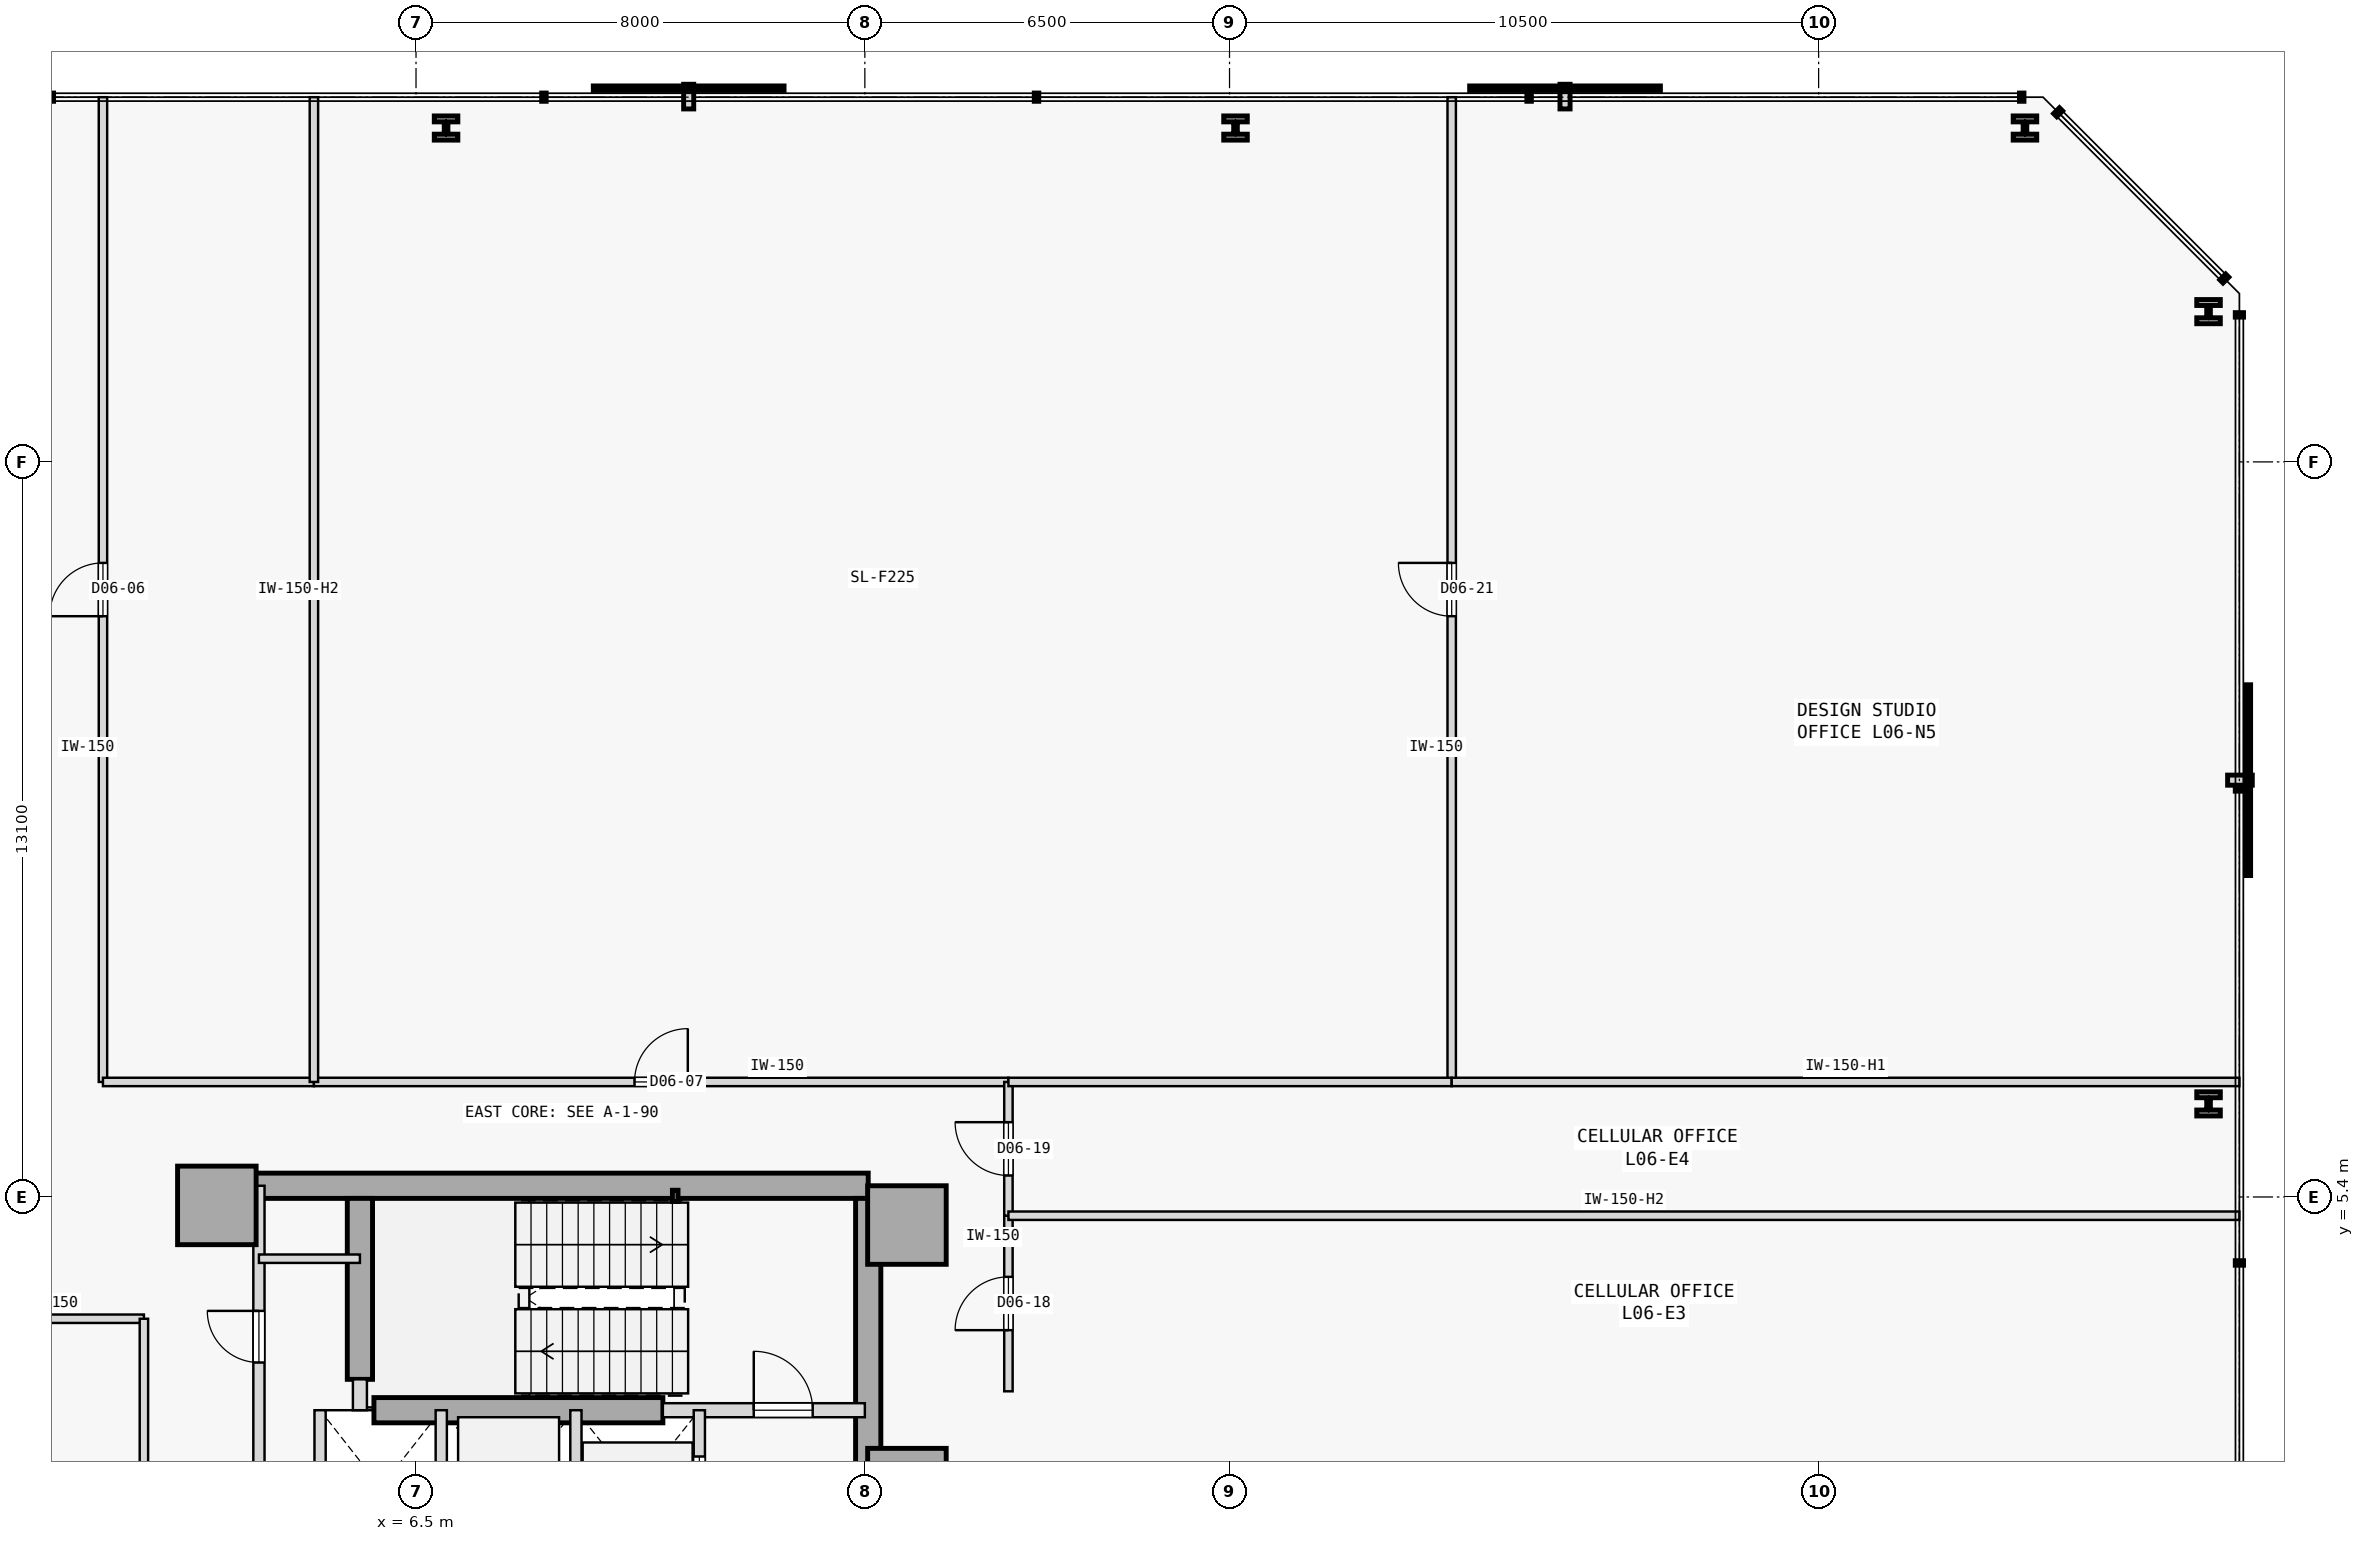
"""IFC4 building model, lengths in metres.
Left out: names, types, materials, properties, quantities, classifications, styles, units other than length and angle.
Written with IfcOpenShell. Run it as: python <this file> out.ifc"""

import sys

from ifc_helpers import new_model, si_unit, direction, frame, frame_2d, origin, origin_2d, place, context, subcontext, project, spatial, rectangle, hollow_rectangle, i_section, extrude, element, fill, save


model = new_model("IFC4")
c1 = context("Model", 3, precision=1e-05, world=origin(), true_north=direction((0.0, 1.0)))
c2 = subcontext(c1, "Body", "Model", "MODEL_VIEW")
j1 = project(units=[si_unit("LENGTHUNIT", "METRE"), si_unit("PLANEANGLEUNIT", "RADIAN")], contexts=[c1])
p1 = place(None, origin())
s1 = spatial("IfcSite", under=j1, at=p1, CompositionType="ELEMENT")
p2 = place(p1, origin())
s2 = spatial("IfcBuilding", under=s1, at=p2, CompositionType="ELEMENT")
p3 = place(p2, frame((0.0, 0.0, 29.4)))
s3 = spatial("IfcBuildingStorey", under=s2, at=p3, CompositionType="ELEMENT", Elevation=29.4)
for number, where, z_axis, x_axis in (
    (1, (15.25, 4.9, 0.0), (0.0, 0.0, 1.0), (1.0, 0.0, 0.0)),
    (2, (15.25, 0.22, 0.0), (0.0, 0.0, 1.0), (1.0, 0.0, 0.0)),
    (3, (2.95, 5.25, 0.0), (0.0, 0.0, 1.0), (1.0, 0.0, 0.0)),
):
    element("IfcColumn", number, at=place(p3, frame(where, z_axis=z_axis, x_axis=x_axis)), inside=s3, PredefinedType="COLUMN", context=c2, shape_type="SweptSolid", body=[
        extrude(rectangle(XDim=1.4, YDim=1.4, at=origin_2d()), origin(), (0.0, 0.0, 1.0), 3.8),
    ])
p4 = place(p3, frame((3.15, 5.6, 0.0), z_axis=(0.0, 0.0, 1.0), x_axis=(1.0, 0.0, 0.0)))
e4 = element("IfcWall", 4, at=p4, inside=s3, PredefinedType="SHEAR", context=c2, shape_type="SweptSolid", body=[
    extrude(rectangle(XDim=11.41, YDim=0.45, at=frame_2d((5.705, 0.0))), origin(), (0.0, 0.0, 1.0), 3.575),
])
p5 = place(p3, frame((14.56, -5.375, 0.0), z_axis=(0.0, 0.0, 1.0), x_axis=(0.0, 1.0, 0.0)))
e5 = element("IfcWall", 5, at=p5, inside=s3, PredefinedType="SHEAR", context=c2, shape_type="SweptSolid", body=[
    extrude(rectangle(XDim=10.75, YDim=0.45, at=frame_2d((5.375, 0.0))), origin(), (0.0, 0.0, 1.0), 3.575),
])
p6 = place(p3, frame((5.5, 2.15, 0.0), z_axis=(0.0, 0.0, 1.0), x_axis=(0.0, 1.0, 0.0)))
e6 = element("IfcWall", 6, at=p6, inside=s3, PredefinedType="SHEAR", context=c2, shape_type="SweptSolid", body=[
    extrude(rectangle(XDim=3.225, YDim=0.45, at=frame_2d((1.613, 0.0))), origin(), (0.0, 0.0, 1.0), 3.575),
])
p7 = place(p3, frame((5.75, 1.6, 0.0), z_axis=(0.0, 0.0, 1.0), x_axis=(1.0, 0.0, 0.0)))
e7 = element("IfcWall", 7, at=p7, inside=s3, PredefinedType="SHEAR", context=c2, shape_type="SweptSolid", body=[
    extrude(rectangle(XDim=5.15, YDim=0.45, at=frame_2d((2.575, 0.0))), origin(), (0.0, 0.0, 1.0), 3.575),
])
p8 = place(p3, frame((11.12, 5.42, 0.0), z_axis=(0.0, 0.0, 1.0), x_axis=(1.0, 0.0, 0.0)))
e8 = element("IfcColumn", 8, at=p8, inside=s3, PredefinedType="COLUMN", context=c2, shape_type="SweptSolid", body=[
    extrude(hollow_rectangle(XDim=0.1, YDim=0.2, WallThickness=0.008, at=origin_2d()), origin(), (0.0, 0.0, 1.0), 3.8),
])
for number, where, z_axis, x_axis in (
    (9, (38.45, 7.059, 0.0), (0.0, 0.0, 1.0), (1.0, 0.0, 0.0)),
    (10, (38.45, 21.178, 0.0), (0.0, 0.0, 1.0), (1.0, 0.0, 0.0)),
    (11, (35.178, 24.45, 0.0), (0.0, 0.0, 1.0), (1.0, 0.0, 0.0)),
    (12, (21.107, 24.45, 0.0), (0.0, 0.0, 1.0), (1.0, 0.0, 0.0)),
    (13, (7.036, 24.45, 0.0), (0.0, 0.0, 1.0), (1.0, 0.0, 0.0)),
):
    element("IfcColumn", number, at=place(p3, frame(where, z_axis=z_axis, x_axis=x_axis)), inside=s3, PredefinedType="COLUMN", context=c2, shape_type="SweptSolid", body=[
        extrude(i_section(OverallWidth=0.42, OverallDepth=0.431, WebThickness=0.065, FlangeThickness=0.106, FilletRadius=0.015, at=origin_2d()), origin(), (0.0, 0.0, 1.0), 3.8),
    ])
p9 = place(p3, frame((10.9, 1.6, 0.0), z_axis=(0.0, 0.0, 1.0), x_axis=(1.0, 0.0, 0.0)))
e14 = element("IfcWall", 14, at=p9, inside=s3, PredefinedType="STANDARD", context=c2, shape_type="SweptSolid", body=[
    extrude(rectangle(XDim=3.6, YDim=0.25, at=frame_2d((1.8, 0.0))), origin(), (0.0, 0.0, 1.0), 3.575),
])
p10 = place(p9, frame((1.62, 0.0, 0.0)))
e15 = element("IfcOpeningElement", 15, at=p10, cuts=e14, PredefinedType="OPENING", context=c2, shape_type="SweptSolid", body=[
    extrude(rectangle(XDim=1.05, YDim=2.15, at=frame_2d((0.525, 1.075))), frame((0.0, 0.135, 0.0), z_axis=(0.0, -1.0, 0.0), x_axis=(1.0, 0.0, 0.0)), (0.0, 0.0, 1.0), 0.27),
])
p11 = place(p3, frame((5.5, 1.6, 0.0), z_axis=(0.0, 0.0, 1.0), x_axis=(0.0, 1.0, 0.0)))
e16 = element("IfcWall", 16, at=p11, inside=s3, PredefinedType="STANDARD", context=c2, shape_type="SweptSolid", body=[
    extrude(rectangle(XDim=0.55, YDim=0.25, at=frame_2d((0.275, 0.0))), origin(), (0.0, 0.0, 1.0), 3.575),
])
p12 = place(p3, frame((3.7, -1.15, 0.0), z_axis=(0.0, 0.0, 1.0), x_axis=(0.0, 1.0, 0.0)))
e17 = element("IfcWall", 17, at=p12, inside=s3, PredefinedType="STANDARD", context=c2, shape_type="SweptSolid", body=[
    extrude(rectangle(XDim=6.75, YDim=0.2, at=frame_2d((3.375, 0.0))), origin(), (0.0, 0.0, 1.0), 3.575),
])
p13 = place(p12, frame((3.6, 0.0, 0.0)))
e18 = element("IfcOpeningElement", 18, at=p13, cuts=e17, PredefinedType="OPENING", context=c2, shape_type="SweptSolid", body=[
    extrude(rectangle(XDim=0.92, YDim=2.15, at=frame_2d((0.46, 1.075))), frame((0.0, 0.11, 0.0), z_axis=(0.0, -1.0, 0.0), x_axis=(1.0, 0.0, 0.0)), (0.0, 0.0, 1.0), 0.22),
])
p14 = place(p3, frame((11.55, -1.15, 0.0), z_axis=(0.0, 0.0, 1.0), x_axis=(0.0, 1.0, 0.0)))
e19 = element("IfcWall", 19, at=p14, inside=s3, PredefinedType="STANDARD", context=c2, shape_type="SweptSolid", body=[
    extrude(rectangle(XDim=2.75, YDim=0.2, at=frame_2d((1.375, 0.0))), origin(), (0.0, 0.0, 1.0), 3.575),
])
p15 = place(p14, frame((0.825, 0.0, 0.0)))
e20 = element("IfcOpeningElement", 20, at=p15, cuts=e19, PredefinedType="OPENING", context=c2, shape_type="SweptSolid", body=[
    extrude(rectangle(XDim=1.1, YDim=2.15, at=frame_2d((0.55, 1.075))), frame((0.0, 0.11, 0.0), z_axis=(0.0, -1.0, 0.0), x_axis=(1.0, 0.0, 0.0)), (0.0, 0.0, 1.0), 0.22),
])
for number, where, z_axis, x_axis in (
    (21, (9.35, -1.15, 0.0), (0.0, 0.0, 1.0), (0.0, 1.0, 0.0)),
    (22, (6.95, -1.15, 0.0), (0.0, 0.0, 1.0), (0.0, 1.0, 0.0)),
    (23, (4.79, -1.15, 0.0), (0.0, 0.0, 1.0), (0.0, 1.0, 0.0)),
):
    element("IfcWall", number, at=place(p3, frame(where, z_axis=z_axis, x_axis=x_axis)), inside=s3, PredefinedType="STANDARD", context=c2, shape_type="SweptSolid", body=[
        extrude(rectangle(XDim=2.75, YDim=0.2, at=frame_2d((1.375, 0.0))), origin(), (0.0, 0.0, 1.0), 3.575),
    ])
p16 = place(p3, frame((3.7, 4.3, 0.0), z_axis=(0.0, 0.0, 1.0), x_axis=(1.0, 0.0, 0.0)))
e24 = element("IfcWall", 24, at=p16, inside=s3, PredefinedType="PARTITIONING", context=c2, shape_type="SweptSolid", body=[
    extrude(rectangle(XDim=1.8, YDim=0.15, at=frame_2d((0.9, 0.0))), origin(), (0.0, 0.0, 1.0), 3.575),
])
p17 = place(p3, frame((-1.65, 3.23, 0.0), z_axis=(0.0, 0.0, 1.0), x_axis=(1.0, 0.0, 0.0)))
e25 = element("IfcWall", 25, at=p17, inside=s3, PredefinedType="PARTITIONING", context=c2, shape_type="SweptSolid", body=[
    extrude(rectangle(XDim=3.3, YDim=0.15, at=frame_2d((1.65, 0.0))), origin(), (0.0, 0.0, 1.0), 3.575),
])
p18 = place(p3, frame((1.65, -3.23, 0.0), z_axis=(0.0, 0.0, 1.0), x_axis=(0.0, 1.0, 0.0)))
e26 = element("IfcWall", 26, at=p18, inside=s3, PredefinedType="PARTITIONING", context=c2, shape_type="SweptSolid", body=[
    extrude(rectangle(XDim=6.46, YDim=0.15, at=frame_2d((3.23, 0.0))), origin(), (0.0, 0.0, 1.0), 3.575),
])
p19 = place(p3, frame((0.92, 7.45, 0.0), z_axis=(0.0, 0.0, 1.0), x_axis=(0.0, 1.0, 0.0)))
e27 = element("IfcWall", 27, at=p19, inside=s3, PredefinedType="PARTITIONING", context=c2, shape_type="SweptSolid", body=[
    extrude(rectangle(XDim=17.55, YDim=0.15, at=frame_2d((8.775, 0.0))), origin(), (0.0, 0.0, 1.0), 3.575),
])
p20 = place(p19, frame((8.3, 0.0, 0.0)))
e28 = element("IfcOpeningElement", 28, at=p20, cuts=e27, PredefinedType="OPENING", context=c2, shape_type="SweptSolid", body=[
    extrude(rectangle(XDim=0.95, YDim=2.15, at=frame_2d((0.475, 1.075))), frame((0.0, 0.085, 0.0), z_axis=(0.0, -1.0, 0.0), x_axis=(1.0, 0.0, 0.0)), (0.0, 0.0, 1.0), 0.17),
])
p21 = place(p3, frame((0.92, 7.45, 0.0), z_axis=(0.0, 0.0, 1.0), x_axis=(1.0, 0.0, 0.0)))
e29 = element("IfcWall", 29, at=p21, inside=s3, PredefinedType="PARTITIONING", context=c2, shape_type="SweptSolid", body=[
    extrude(rectangle(XDim=3.76, YDim=0.15, at=frame_2d((1.88, 0.0))), origin(), (0.0, 0.0, 1.0), 3.575),
])
p22 = place(p3, frame((4.68, 7.45, 0.0), z_axis=(0.0, 0.0, 1.0), x_axis=(1.0, 0.0, 0.0)))
e30 = element("IfcWall", 30, at=p22, inside=s3, PredefinedType="PARTITIONING", context=c2, shape_type="SweptSolid", body=[
    extrude(rectangle(XDim=12.379, YDim=0.15, at=frame_2d((6.189, 0.0))), origin(), (0.0, 0.0, 1.0), 3.575),
])
p23 = place(p22, frame((5.715, 0.0, 0.0)))
e31 = element("IfcOpeningElement", 31, at=p23, cuts=e30, PredefinedType="OPENING", context=c2, shape_type="SweptSolid", body=[
    extrude(rectangle(XDim=0.95, YDim=2.15, at=frame_2d((0.475, 1.075))), frame((0.0, 0.085, 0.0), z_axis=(0.0, -1.0, 0.0), x_axis=(1.0, 0.0, 0.0)), (0.0, 0.0, 1.0), 0.17),
])
p24 = place(p3, frame((17.059, 1.937, 0.0), z_axis=(0.0, 0.0, 1.0), x_axis=(0.0, 1.0, 0.0)))
e32 = element("IfcWall", 32, at=p24, inside=s3, PredefinedType="PARTITIONING", context=c2, shape_type="SweptSolid", body=[
    extrude(rectangle(XDim=3.129, YDim=0.15, at=frame_2d((1.564, 0.0))), origin(), (0.0, 0.0, 1.0), 3.575),
])
p25 = place(p24, frame((1.09, 0.0, 0.0)))
e33 = element("IfcOpeningElement", 33, at=p25, cuts=e32, PredefinedType="OPENING", context=c2, shape_type="SweptSolid", body=[
    extrude(rectangle(XDim=0.95, YDim=2.15, at=frame_2d((0.475, 1.075))), frame((0.0, 0.085, 0.0), z_axis=(0.0, -1.0, 0.0), x_axis=(1.0, 0.0, 0.0)), (0.0, 0.0, 1.0), 0.17),
])
p26 = place(p3, frame((17.059, 5.066, 0.0), z_axis=(0.0, 0.0, 1.0), x_axis=(0.0, 1.0, 0.0)))
e34 = element("IfcWall", 34, at=p26, inside=s3, PredefinedType="PARTITIONING", context=c2, shape_type="SweptSolid", body=[
    extrude(rectangle(XDim=2.384, YDim=0.15, at=frame_2d((1.192, 0.0))), origin(), (0.0, 0.0, 1.0), 3.575),
])
p27 = place(p26, frame((0.717, 0.0, 0.0)))
e35 = element("IfcOpeningElement", 35, at=p27, cuts=e34, PredefinedType="OPENING", context=c2, shape_type="SweptSolid", body=[
    extrude(rectangle(XDim=0.95, YDim=2.15, at=frame_2d((0.475, 1.075))), frame((0.0, 0.085, 0.0), z_axis=(0.0, -1.0, 0.0), x_axis=(1.0, 0.0, 0.0)), (0.0, 0.0, 1.0), 0.17),
])
p28 = place(p3, frame((4.68, 7.45, 0.0), z_axis=(0.0, 0.0, 1.0), x_axis=(0.0, 1.0, 0.0)))
e36 = element("IfcWall", 36, at=p28, inside=s3, PredefinedType="PARTITIONING", context=c2, shape_type="SweptSolid", body=[
    extrude(rectangle(XDim=17.55, YDim=0.15, at=frame_2d((8.775, 0.0))), origin(), (0.0, 0.0, 1.0), 2.975),
])
p29 = place(p3, frame((24.96, 7.45, 0.0), z_axis=(0.0, 0.0, 1.0), x_axis=(0.0, 1.0, 0.0)))
e37 = element("IfcWall", 37, at=p29, inside=s3, PredefinedType="PARTITIONING", context=c2, shape_type="SweptSolid", body=[
    extrude(rectangle(XDim=17.55, YDim=0.15, at=frame_2d((8.775, 0.0))), origin(), (0.0, 0.0, 1.0), 3.575),
])
p30 = place(p29, frame((8.3, 0.0, 0.0)))
e38 = element("IfcOpeningElement", 38, at=p30, cuts=e37, PredefinedType="OPENING", context=c2, shape_type="SweptSolid", body=[
    extrude(rectangle(XDim=0.95, YDim=2.15, at=frame_2d((0.475, 1.075))), frame((0.0, 0.085, 0.0), z_axis=(0.0, -1.0, 0.0), x_axis=(1.0, 0.0, 0.0)), (0.0, 0.0, 1.0), 0.17),
])
p31 = place(p3, frame((17.059, 7.45, 0.0), z_axis=(0.0, 0.0, 1.0), x_axis=(1.0, 0.0, 0.0)))
e39 = element("IfcWall", 39, at=p31, inside=s3, PredefinedType="PARTITIONING", context=c2, shape_type="SweptSolid", body=[
    extrude(rectangle(XDim=7.901, YDim=0.15, at=frame_2d((3.95, 0.0))), origin(), (0.0, 0.0, 1.0), 3.575),
])
p32 = place(p3, frame((24.96, 7.45, 0.0), z_axis=(0.0, 0.0, 1.0), x_axis=(1.0, 0.0, 0.0)))
e40 = element("IfcWall", 40, at=p32, inside=s3, PredefinedType="PARTITIONING", context=c2, shape_type="SweptSolid", body=[
    extrude(rectangle(XDim=14.04, YDim=0.15, at=frame_2d((7.02, 0.0))), origin(), (0.0, 0.0, 1.0), 3.125),
])
p33 = place(p3, frame((17.059, 5.066, 0.0), z_axis=(0.0, 0.0, 1.0), x_axis=(1.0, 0.0, 0.0)))
e41 = element("IfcWall", 41, at=p33, inside=s3, PredefinedType="PARTITIONING", context=c2, shape_type="SweptSolid", body=[
    extrude(rectangle(XDim=21.941, YDim=0.15, at=frame_2d((10.97, 0.0))), origin(), (0.0, 0.0, 1.0), 2.975),
])
p34 = place(p10, origin())
e42 = element("IfcDoor", 42, at=p34, inside=s3, OperationType="SINGLE_SWING_LEFT", PredefinedType="DOOR", context=c2, shape_type="SweptSolid", body=[
    extrude(rectangle(XDim=1.05, YDim=2.15, at=frame_2d((0.525, 1.075))), frame((0.0, 0.025, 0.0), z_axis=(0.0, -1.0, 0.0), x_axis=(1.0, 0.0, 0.0)), (0.0, 0.0, 1.0), 0.05),
])
fill(e15, e42)
p35 = place(p15, origin())
e43 = element("IfcDoor", 43, at=p35, inside=s3, OperationType="SLIDING_TO_RIGHT", PredefinedType="DOOR", context=c2, shape_type="SweptSolid", body=[
    extrude(rectangle(XDim=1.1, YDim=2.15, at=frame_2d((0.55, 1.075))), frame((0.0, 0.025, 0.0), z_axis=(0.0, -1.0, 0.0), x_axis=(1.0, 0.0, 0.0)), (0.0, 0.0, 1.0), 0.05),
])
fill(e20, e43)
p36 = place(p13, origin())
e44 = element("IfcDoor", 44, at=p36, inside=s3, OperationType="SINGLE_SWING_RIGHT", PredefinedType="DOOR", context=c2, shape_type="SweptSolid", body=[
    extrude(rectangle(XDim=0.92, YDim=2.15, at=frame_2d((0.46, 1.075))), frame((0.0, 0.025, 0.0), z_axis=(0.0, -1.0, 0.0), x_axis=(1.0, 0.0, 0.0)), (0.0, 0.0, 1.0), 0.05),
])
fill(e18, e44)
p37 = place(p20, origin())
e45 = element("IfcDoor", 45, at=p37, inside=s3, OperationType="SINGLE_SWING_LEFT", PredefinedType="DOOR", context=c2, shape_type="SweptSolid", body=[
    extrude(rectangle(XDim=0.95, YDim=2.15, at=frame_2d((0.475, 1.075))), frame((0.0, 0.025, 0.0), z_axis=(0.0, -1.0, 0.0), x_axis=(1.0, 0.0, 0.0)), (0.0, 0.0, 1.0), 0.05),
])
fill(e28, e45)
p38 = place(p23, origin())
e46 = element("IfcDoor", 46, at=p38, inside=s3, OperationType="SINGLE_SWING_RIGHT", PredefinedType="DOOR", context=c2, shape_type="SweptSolid", body=[
    extrude(rectangle(XDim=0.95, YDim=2.15, at=frame_2d((0.475, 1.075))), frame((0.0, 0.025, 0.0), z_axis=(0.0, -1.0, 0.0), x_axis=(1.0, 0.0, 0.0)), (0.0, 0.0, 1.0), 0.05),
])
fill(e31, e46)
p39 = place(p25, origin())
e47 = element("IfcDoor", 47, at=p39, inside=s3, OperationType="SINGLE_SWING_LEFT", PredefinedType="DOOR", context=c2, shape_type="SweptSolid", body=[
    extrude(rectangle(XDim=0.95, YDim=2.15, at=frame_2d((0.475, 1.075))), frame((0.0, 0.025, 0.0), z_axis=(0.0, -1.0, 0.0), x_axis=(1.0, 0.0, 0.0)), (0.0, 0.0, 1.0), 0.05),
])
fill(e33, e47)
p40 = place(p27, origin())
e48 = element("IfcDoor", 48, at=p40, inside=s3, OperationType="SINGLE_SWING_RIGHT", PredefinedType="DOOR", context=c2, shape_type="SweptSolid", body=[
    extrude(rectangle(XDim=0.95, YDim=2.15, at=frame_2d((0.475, 1.075))), frame((0.0, 0.025, 0.0), z_axis=(0.0, -1.0, 0.0), x_axis=(1.0, 0.0, 0.0)), (0.0, 0.0, 1.0), 0.05),
])
fill(e35, e48)
p41 = place(p30, origin())
e49 = element("IfcDoor", 49, at=p41, inside=s3, OperationType="SINGLE_SWING_RIGHT", PredefinedType="DOOR", context=c2, shape_type="SweptSolid", body=[
    extrude(rectangle(XDim=0.95, YDim=2.15, at=frame_2d((0.475, 1.075))), frame((0.0, 0.025, 0.0), z_axis=(0.0, -1.0, 0.0), x_axis=(1.0, 0.0, 0.0)), (0.0, 0.0, 1.0), 0.05),
])
fill(e38, e49)
save(model, sys.argv[1])
